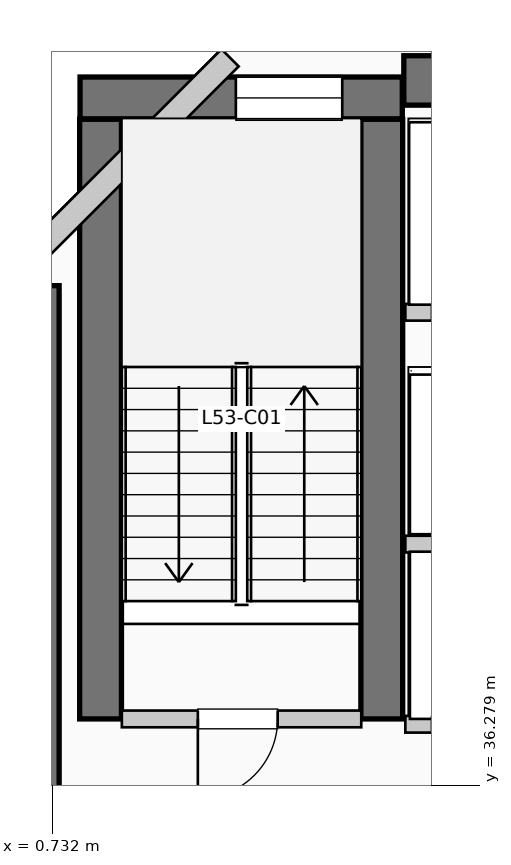
"""IFC4 building model, lengths in metres.
Left out: names, types, materials, properties, quantities, classifications, styles, units other than length and angle.
Written with IfcOpenShell. Run it as: python <this file> out.ifc"""

import sys

from ifc_helpers import new_model, si_unit, direction, frame, frame_2d, origin, place, context, subcontext, project, spatial, rectangle, extrude, element, fill, save


model = new_model("IFC4")
c1 = context("Model", 3, precision=1e-05, world=origin(), true_north=direction((0.0, 1.0)))
c2 = subcontext(c1, "Body", "Model", "MODEL_VIEW")
j1 = project(units=[si_unit("LENGTHUNIT", "METRE"), si_unit("PLANEANGLEUNIT", "RADIAN")], contexts=[c1])
p1 = place(None, origin())
s1 = spatial("IfcSite", under=j1, at=p1, CompositionType="ELEMENT")
p2 = place(p1, origin())
s2 = spatial("IfcBuilding", under=s1, at=p2, CompositionType="ELEMENT")
p3 = place(p2, frame((0.0, 0.0, 219.78)))
s3 = spatial("IfcBuildingStorey", under=s2, at=p3, CompositionType="ELEMENT", Elevation=219.78)
p4 = place(p3, frame((5.36, 45.55, 0.0), z_axis=(0.0, 0.0, 1.0), x_axis=(1.0, 0.0, 0.0)))
e1 = element("IfcWall", 1, at=p4, inside=s3, PredefinedType="SHEAR", context=c2, shape_type="SweptSolid", body=[
    extrude(rectangle(XDim=13.98, YDim=0.65, at=frame_2d((6.99, 0.0))), origin(), (0.0, 0.0, 1.0), 3.96),
])
p5 = place(p3, frame((0.5, 34.95, 0.0), z_axis=(0.0, 0.0, 1.0), x_axis=(0.0, 1.0, 0.0)))
e2 = element("IfcWall", 2, at=p5, inside=s3, PredefinedType="SHEAR", context=c2, shape_type="SweptSolid", body=[
    extrude(rectangle(XDim=7.9, YDim=0.65, at=frame_2d((3.95, 0.0))), origin(), (0.0, 0.0, 1.0), 3.96),
])
for number, where, z_axis, x_axis in (
    (3, (1.37, 37.15, 0.0), (0.0, 0.0, 1.0), (0.0, 1.0, 0.0)),
    (4, (5.07, 37.15, 0.0), (0.0, 0.0, 1.0), (0.0, 1.0, 0.0)),
):
    element("IfcWall", number, at=place(p3, frame(where, z_axis=z_axis, x_axis=x_axis)), inside=s3, PredefinedType="SHEAR", context=c2, shape_type="SweptSolid", body=[
        extrude(rectangle(XDim=7.89, YDim=0.55, at=frame_2d((3.945, 0.0))), origin(), (0.0, 0.0, 1.0), 3.96),
    ])
p6 = place(p3, frame((1.1, 45.32, 0.0), z_axis=(0.0, 0.0, 1.0), x_axis=(1.0, 0.0, 0.0)))
e5 = element("IfcWall", 5, at=p6, inside=s3, PredefinedType="SHEAR", context=c2, shape_type="SweptSolid", body=[
    extrude(rectangle(XDim=4.24, YDim=0.55, at=frame_2d((2.12, 0.0))), origin(), (0.0, 0.0, 1.0), 3.96),
])
p7 = place(p6, frame((2.05, 0.0, 1.05)))
e6 = element("IfcOpeningElement", 6, at=p7, cuts=e5, PredefinedType="OPENING", context=c2, shape_type="SweptSolid", body=[
    extrude(rectangle(XDim=1.4, YDim=1.8, at=frame_2d((0.7, 0.9))), frame((0.0, 0.285, 0.0), z_axis=(0.0, -1.0, 0.0), x_axis=(1.0, 0.0, 0.0)), (0.0, 0.0, 1.0), 0.57),
])
p8 = place(p3, frame((3.074, 45.848, 0.0), z_axis=(0.0, 0.0, 1.0), x_axis=(-0.707106781187, -0.707106781187, 0.0)))
e7 = element("IfcWall", 7, at=p8, inside=s3, PredefinedType="SOLIDWALL", context=c2, shape_type="SweptSolid", body=[
    extrude(rectangle(XDim=4.133, YDim=0.32, at=frame_2d((2.066, 0.0))), origin(), (0.0, 0.0, 1.0), 3.71),
])
p9 = place(p3, frame((1.65, 37.15, 0.0), z_axis=(0.0, 0.0, 1.0), x_axis=(1.0, 0.0, 0.0)))
e8 = element("IfcWall", 8, at=p9, inside=s3, PredefinedType="PARTITIONING", context=c2, shape_type="SweptSolid", body=[
    extrude(rectangle(XDim=3.15, YDim=0.22, at=frame_2d((1.575, 0.0))), origin(), (0.0, 0.0, 1.0), 3.71),
])
p10 = place(p9, frame((2.05, 0.0, 0.0), z_axis=(0.0, 0.0, 1.0), x_axis=(-1.0, 0.0, 0.0)))
e9 = element("IfcOpeningElement", 9, at=p10, cuts=e8, PredefinedType="OPENING", context=c2, shape_type="SweptSolid", body=[
    extrude(rectangle(XDim=1.05, YDim=2.15, at=frame_2d((0.525, 1.075))), frame((0.0, 0.12, 0.0), z_axis=(0.0, -1.0, 0.0), x_axis=(1.0, 0.0, 0.0)), (0.0, 0.0, 1.0), 0.24),
])
p11 = place(p3, frame((5.38, 37.08, 0.0), z_axis=(0.0, 0.0, 1.0), x_axis=(1.0, 0.0, 0.0)))
e10 = element("IfcWall", 10, at=p11, inside=s3, PredefinedType="PARTITIONING", context=c2, shape_type="SweptSolid", body=[
    extrude(rectangle(XDim=3.46, YDim=0.22, at=frame_2d((1.73, 0.0))), origin(), (0.0, 0.0, 1.0), 3.71),
])
p12 = place(p11, frame((1.55, 0.0, 0.0), z_axis=(0.0, 0.0, 1.0), x_axis=(-1.0, 0.0, 0.0)))
e11 = element("IfcOpeningElement", 11, at=p12, cuts=e10, PredefinedType="OPENING", context=c2, shape_type="SweptSolid", body=[
    extrude(rectangle(XDim=1.2, YDim=2.2, at=frame_2d((0.6, 1.1))), frame((0.0, 0.12, 0.0), z_axis=(0.0, -1.0, 0.0), x_axis=(1.0, 0.0, 0.0)), (0.0, 0.0, 1.0), 0.24),
])
p13 = place(p11, frame((3.22, 0.0, 0.0), z_axis=(0.0, 0.0, 1.0), x_axis=(-1.0, 0.0, 0.0)))
e12 = element("IfcOpeningElement", 12, at=p13, cuts=e10, PredefinedType="OPENING", context=c2, shape_type="SweptSolid", body=[
    extrude(rectangle(XDim=1.2, YDim=2.2, at=frame_2d((0.6, 1.1))), frame((0.0, 0.12, 0.0), z_axis=(0.0, -1.0, 0.0), x_axis=(1.0, 0.0, 0.0)), (0.0, 0.0, 1.0), 0.24),
])
p14 = place(p3, frame((5.38, 39.45, 0.0), z_axis=(0.0, 0.0, 1.0), x_axis=(1.0, 0.0, 0.0)))
e13 = element("IfcWall", 13, at=p14, inside=s3, PredefinedType="PARTITIONING", context=c2, shape_type="SweptSolid", body=[
    extrude(rectangle(XDim=3.46, YDim=0.22, at=frame_2d((1.73, 0.0))), origin(), (0.0, 0.0, 1.0), 3.71),
])
p15 = place(p3, frame((5.38, 42.5, 0.0), z_axis=(0.0, 0.0, 1.0), x_axis=(1.0, 0.0, 0.0)))
e14 = element("IfcWall", 14, at=p15, inside=s3, PredefinedType="PARTITIONING", context=c2, shape_type="SweptSolid", body=[
    extrude(rectangle(XDim=3.77, YDim=0.22, at=frame_2d((1.885, 0.0))), origin(), (0.0, 0.0, 1.0), 3.71),
])
p16 = place(p15, frame((1.75, 0.0, 0.0), z_axis=(0.0, 0.0, 1.0), x_axis=(-1.0, 0.0, 0.0)))
e15 = element("IfcOpeningElement", 15, at=p16, cuts=e14, PredefinedType="OPENING", context=c2, shape_type="SweptSolid", body=[
    extrude(rectangle(XDim=1.4, YDim=2.2, at=frame_2d((0.7, 1.1))), frame((0.0, 0.12, 0.0), z_axis=(0.0, -1.0, 0.0), x_axis=(1.0, 0.0, 0.0)), (0.0, 0.0, 1.0), 0.24),
])
p17 = place(p15, frame((3.53, 0.0, 0.0), z_axis=(0.0, 0.0, 1.0), x_axis=(-1.0, 0.0, 0.0)))
e16 = element("IfcOpeningElement", 16, at=p17, cuts=e14, PredefinedType="OPENING", context=c2, shape_type="SweptSolid", body=[
    extrude(rectangle(XDim=1.4, YDim=2.2, at=frame_2d((0.7, 1.1))), frame((0.0, 0.12, 0.0), z_axis=(0.0, -1.0, 0.0), x_axis=(1.0, 0.0, 0.0)), (0.0, 0.0, 1.0), 0.24),
])
p18 = place(p7, origin())
e17 = element("IfcWindow", 17, at=p18, inside=s3, PartitioningType="SINGLE_PANEL", PredefinedType="WINDOW", context=c2, shape_type="SweptSolid", body=[
    extrude(rectangle(XDim=1.4, YDim=1.8, at=frame_2d((0.7, 0.9))), frame((0.0, 0.03, 0.0), z_axis=(0.0, -1.0, 0.0), x_axis=(1.0, 0.0, 0.0)), (0.0, 0.0, 1.0), 0.06),
])
fill(e6, e17)
p19 = place(p10, origin())
e18 = element("IfcDoor", 18, at=p19, inside=s3, OperationType="SINGLE_SWING_LEFT", PredefinedType="DOOR", context=c2, shape_type="SweptSolid", body=[
    extrude(rectangle(XDim=1.05, YDim=2.15, at=frame_2d((0.525, 1.075))), frame((0.0, 0.025, 0.0), z_axis=(0.0, -1.0, 0.0), x_axis=(1.0, 0.0, 0.0)), (0.0, 0.0, 1.0), 0.05),
])
fill(e9, e18)
save(model, sys.argv[1])
